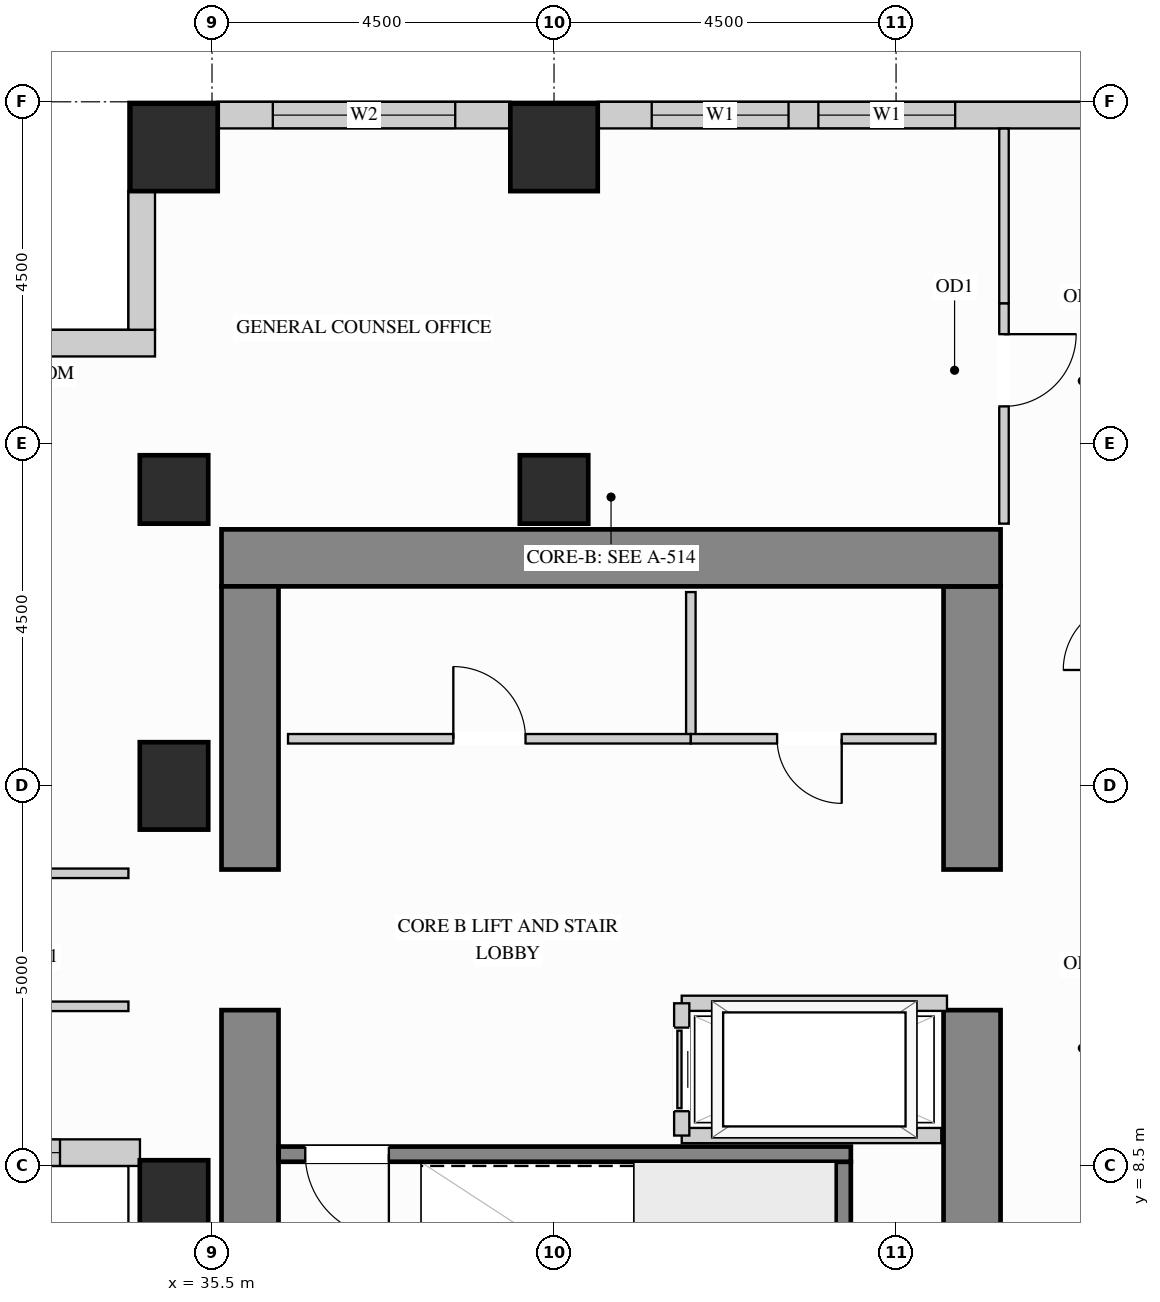
"""IFC4 building model, lengths in metres.
Left out: names, types, materials, properties, quantities, classifications, styles, units other than length and angle.
Written with IfcOpenShell. Run it as: python <this file> out.ifc"""

import sys

from ifc_helpers import new_model, si_unit, direction, frame, frame_2d, origin, origin_2d, place, context, subcontext, project, spatial, rectangle, extrude, source, transform, mapped, element, fill, save


model = new_model("IFC4")
c1 = context("Model", 3, precision=1e-05, world=origin(), true_north=direction((0.0, 1.0)))
c2 = subcontext(c1, "Body", "Model", "MODEL_VIEW")
j1 = project(units=[si_unit("LENGTHUNIT", "METRE"), si_unit("PLANEANGLEUNIT", "RADIAN")], contexts=[c1])
p1 = place(None, origin())
s1 = spatial("IfcSite", under=j1, at=p1, CompositionType="ELEMENT")
p2 = place(p1, origin())
s2 = spatial("IfcBuilding", under=s1, at=p2, CompositionType="ELEMENT")
p3 = place(p2, frame((0.0, 0.0, 88.2)))
s3 = spatial("IfcBuildingStorey", under=s2, at=p3, CompositionType="ELEMENT", Elevation=88.2)
m1 = source(origin(), c2, "Body", "SweptSolid", [
    extrude(rectangle(XDim=0.9, YDim=0.9, at=origin_2d()), origin(), (0.0, 0.0, 1.0), 3.38),
])
for number, where, z_axis, x_axis in (
    (1, (35.0, 17.4, 0.0), (0.0, 0.0, 1.0), (1.0, 0.0, 0.0)),
    (2, (40.0, 17.4, 0.0), (0.0, 0.0, 1.0), (1.0, 0.0, 0.0)),
):
    element("IfcColumn", number, at=place(p3, frame(where, z_axis=z_axis, x_axis=x_axis)), inside=s3, PredefinedType="COLUMN", context=c2, shape_type="MappedRepresentation", body=[
        mapped(m1, transform((0.0, 0.0, 0.0), x_axis=(1.0, 0.0, 0.0), y_axis=(0.0, 1.0, 0.0), z_axis=(0.0, 0.0, 1.0))),
    ])
m2 = source(origin(), c2, "Body", "SweptSolid", [
    extrude(rectangle(XDim=0.9, YDim=1.15, at=origin_2d()), origin(), (0.0, 0.0, 1.0), 3.38),
])
for number, where, z_axis, x_axis in (
    (3, (35.0, 13.5, 0.0), (0.0, 0.0, 1.0), (1.0, 0.0, 0.0)),
    (4, (35.0, 8.0, 0.0), (0.0, 0.0, 1.0), (1.0, 0.0, 0.0)),
):
    element("IfcColumn", number, at=place(p3, frame(where, z_axis=z_axis, x_axis=x_axis)), inside=s3, PredefinedType="COLUMN", context=c2, shape_type="MappedRepresentation", body=[
        mapped(m2, transform((0.0, 0.0, 0.0), x_axis=(1.0, 0.0, 0.0), y_axis=(0.0, 1.0, 0.0), z_axis=(0.0, 0.0, 1.0))),
    ])
m3 = source(origin(), c2, "Body", "SweptSolid", [
    extrude(rectangle(XDim=1.15, YDim=1.15, at=origin_2d()), origin(), (0.0, 0.0, 1.0), 3.38),
])
for number, where, z_axis, x_axis in (
    (5, (35.0, 21.9, 0.0), (0.0, 0.0, 1.0), (1.0, 0.0, 0.0)),
    (6, (40.0, 21.9, 0.0), (0.0, 0.0, 1.0), (1.0, 0.0, 0.0)),
):
    element("IfcColumn", number, at=place(p3, frame(where, z_axis=z_axis, x_axis=x_axis)), inside=s3, PredefinedType="COLUMN", context=c2, shape_type="MappedRepresentation", body=[
        mapped(m3, transform((0.0, 0.0, 0.0), x_axis=(1.0, 0.0, 0.0), y_axis=(0.0, 1.0, 0.0), z_axis=(0.0, 0.0, 1.0))),
    ])
m4 = source(origin(), c2, "Body", "SweptSolid", [
    extrude(rectangle(XDim=5.675, YDim=0.75, at=frame_2d((2.837, 0.0))), origin(), (0.0, 0.0, 1.0), 3.38),
])
p4 = place(p3, frame((45.5, 4.875, 0.0), z_axis=(0.0, 0.0, 1.0), x_axis=(0.0, 1.0, 0.0)))
e7 = element("IfcWall", 7, at=p4, inside=s3, PredefinedType="SHEAR", context=c2, shape_type="MappedRepresentation", body=[
    mapped(m4, transform((0.0, 0.0, 0.0), x_axis=(1.0, 0.0, 0.0), y_axis=(0.0, 1.0, 0.0), z_axis=(0.0, 0.0, 1.0))),
])
m5 = source(origin(), c2, "Body", "SweptSolid", [
    extrude(rectangle(XDim=3.725, YDim=0.75, at=frame_2d((1.863, 0.0))), origin(), (0.0, 0.0, 1.0), 3.38),
])
p5 = place(p3, frame((45.5, 12.4, 0.0), z_axis=(0.0, 0.0, 1.0), x_axis=(0.0, 1.0, 0.0)))
e8 = element("IfcWall", 8, at=p5, inside=s3, PredefinedType="SHEAR", context=c2, shape_type="MappedRepresentation", body=[
    mapped(m5, transform((0.0, 0.0, 0.0), x_axis=(1.0, 0.0, 0.0), y_axis=(0.0, 1.0, 0.0), z_axis=(0.0, 0.0, 1.0))),
])
m6 = source(origin(), c2, "Body", "SweptSolid", [
    extrude(rectangle(XDim=10.25, YDim=0.75, at=frame_2d((5.125, 0.0))), origin(), (0.0, 0.0, 1.0), 3.38),
])
p6 = place(p3, frame((35.625, 16.5, 0.0), z_axis=(0.0, 0.0, 1.0), x_axis=(1.0, 0.0, 0.0)))
e9 = element("IfcWall", 9, at=p6, inside=s3, PredefinedType="SHEAR", context=c2, shape_type="MappedRepresentation", body=[
    mapped(m6, transform((0.0, 0.0, 0.0), x_axis=(1.0, 0.0, 0.0), y_axis=(0.0, 1.0, 0.0), z_axis=(0.0, 0.0, 1.0))),
])
p7 = place(p3, frame((36.0, 4.875, 0.0), z_axis=(0.0, 0.0, 1.0), x_axis=(0.0, 1.0, 0.0)))
e10 = element("IfcWall", 10, at=p7, inside=s3, PredefinedType="SHEAR", context=c2, shape_type="MappedRepresentation", body=[
    mapped(m4, transform((0.0, 0.0, 0.0), x_axis=(1.0, 0.0, 0.0), y_axis=(0.0, 1.0, 0.0), z_axis=(0.0, 0.0, 1.0))),
])
p8 = place(p3, frame((36.0, 12.4, 0.0), z_axis=(0.0, 0.0, 1.0), x_axis=(0.0, 1.0, 0.0)))
e11 = element("IfcWall", 11, at=p8, inside=s3, PredefinedType="SHEAR", context=c2, shape_type="MappedRepresentation", body=[
    mapped(m5, transform((0.0, 0.0, 0.0), x_axis=(1.0, 0.0, 0.0), y_axis=(0.0, 1.0, 0.0), z_axis=(0.0, 0.0, 1.0))),
])
p9 = place(p3, frame((30.948, 8.675, 0.0), z_axis=(0.0, 0.0, 1.0), x_axis=(1.0, 0.0, 0.0)))
e12 = element("IfcWall", 12, at=p9, inside=s3, PredefinedType="SOLIDWALL", context=c2, shape_type="SweptSolid", body=[
    extrude(rectangle(XDim=3.604, YDim=0.35, at=frame_2d((1.802, 0.0))), origin(), (0.0, 0.0, 1.0), 3.365),
])
p10 = place(p9, frame((1.052, 0.0, 0.78)))
e13 = element("IfcOpeningElement", 13, at=p10, cuts=e12, PredefinedType="OPENING", context=c2, shape_type="SweptSolid", body=[
    extrude(rectangle(XDim=1.5, YDim=2.0, at=frame_2d((0.75, 1.0))), frame((0.0, 0.185, 0.0), z_axis=(0.0, -1.0, 0.0), x_axis=(1.0, 0.0, 0.0)), (0.0, 0.0, 1.0), 0.37),
])
p11 = place(p3, frame((47.027, 22.325, 0.0), z_axis=(0.0, 0.0, 1.0), x_axis=(-1.0, 0.0, 0.0)))
e14 = element("IfcWall", 14, at=p11, inside=s3, PredefinedType="SOLIDWALL", context=c2, shape_type="SweptSolid", body=[
    extrude(rectangle(XDim=6.454, YDim=0.35, at=frame_2d((3.227, 0.0))), origin(), (0.0, 0.0, 1.0), 3.365),
])
p12 = place(p11, frame((1.749, 0.0, 0.78)))
e15 = element("IfcOpeningElement", 15, at=p12, cuts=e14, PredefinedType="OPENING", context=c2, shape_type="SweptSolid", body=[
    extrude(rectangle(XDim=1.8, YDim=2.1, at=frame_2d((0.9, 1.05))), frame((0.0, 0.185, 0.0), z_axis=(0.0, -1.0, 0.0), x_axis=(1.0, 0.0, 0.0)), (0.0, 0.0, 1.0), 0.37),
])
p13 = place(p11, frame((3.942, 0.0, 0.78)))
e16 = element("IfcOpeningElement", 16, at=p13, cuts=e14, PredefinedType="OPENING", context=c2, shape_type="SweptSolid", body=[
    extrude(rectangle(XDim=1.8, YDim=2.1, at=frame_2d((0.9, 1.05))), frame((0.0, 0.185, 0.0), z_axis=(0.0, -1.0, 0.0), x_axis=(1.0, 0.0, 0.0)), (0.0, 0.0, 1.0), 0.37),
])
p14 = place(p3, frame((39.427, 22.325, 0.0), z_axis=(0.0, 0.0, 1.0), x_axis=(-1.0, 0.0, 0.0)))
e17 = element("IfcWall", 17, at=p14, inside=s3, PredefinedType="SOLIDWALL", context=c2, shape_type="SweptSolid", body=[
    extrude(rectangle(XDim=3.854, YDim=0.35, at=frame_2d((1.927, 0.0))), origin(), (0.0, 0.0, 1.0), 3.365),
])
p15 = place(p14, frame((0.727, 0.0, 0.78)))
e18 = element("IfcOpeningElement", 18, at=p15, cuts=e17, PredefinedType="OPENING", context=c2, shape_type="SweptSolid", body=[
    extrude(rectangle(XDim=2.4, YDim=2.1, at=frame_2d((1.2, 1.05))), frame((0.0, 0.185, 0.0), z_axis=(0.0, -1.0, 0.0), x_axis=(1.0, 0.0, 0.0)), (0.0, 0.0, 1.0), 0.37),
])
m7 = source(origin(), c2, "Body", "SweptSolid", [
    extrude(rectangle(XDim=1.829, YDim=0.35, at=frame_2d((0.915, 0.0))), origin(), (0.0, 0.0, 1.0), 3.365),
])
p16 = place(p3, frame((34.575, 21.327, 0.0), z_axis=(0.0, 0.0, 1.0), x_axis=(0.0, -1.0, 0.0)))
e19 = element("IfcWall", 19, at=p16, inside=s3, PredefinedType="SOLIDWALL", context=c2, shape_type="MappedRepresentation", body=[
    mapped(m7, transform((0.0, 0.0, 0.0), x_axis=(1.0, 0.0, 0.0), y_axis=(0.0, 1.0, 0.0), z_axis=(0.0, 0.0, 1.0))),
])
p17 = place(p3, frame((34.75, 19.325, 0.0), z_axis=(0.0, 0.0, 1.0), x_axis=(-1.0, 0.0, 0.0)))
e20 = element("IfcWall", 20, at=p17, inside=s3, PredefinedType="SOLIDWALL", context=c2, shape_type="SweptSolid", body=[
    extrude(rectangle(XDim=15.6, YDim=0.35, at=frame_2d((7.8, 0.0))), origin(), (0.0, 0.0, 1.0), 3.365),
])
p18 = place(p17, frame((4.307, 0.0, 0.78)))
e21 = element("IfcOpeningElement", 21, at=p18, cuts=e20, PredefinedType="OPENING", context=c2, shape_type="SweptSolid", body=[
    extrude(rectangle(XDim=1.5, YDim=2.0, at=frame_2d((0.75, 1.0))), frame((0.0, 0.185, 0.0), z_axis=(0.0, -1.0, 0.0), x_axis=(1.0, 0.0, 0.0)), (0.0, 0.0, 1.0), 0.37),
])
p19 = place(p17, frame((9.793, 0.0, 0.78)))
e22 = element("IfcOpeningElement", 22, at=p19, cuts=e20, PredefinedType="OPENING", context=c2, shape_type="SweptSolid", body=[
    extrude(rectangle(XDim=1.5, YDim=2.0, at=frame_2d((0.75, 1.0))), frame((0.0, 0.185, 0.0), z_axis=(0.0, -1.0, 0.0), x_axis=(1.0, 0.0, 0.0)), (0.0, 0.0, 1.0), 0.37),
])
m8 = source(origin(), c2, "Body", "SweptSolid", [
    extrude(rectangle(XDim=1.93, YDim=0.125, at=frame_2d((0.965, 0.0))), origin(), (0.0, 0.0, 1.0), 3.365),
])
p20 = place(p3, frame((41.8, 14.12, 0.0), z_axis=(0.0, 0.0, 1.0), x_axis=(0.0, 1.0, 0.0)))
e23 = element("IfcWall", 23, at=p20, inside=s3, PredefinedType="PARTITIONING", context=c2, shape_type="MappedRepresentation", body=[
    mapped(m8, transform((0.0, 0.0, 0.0), x_axis=(1.0, 0.0, 0.0), y_axis=(0.0, 1.0, 0.0), z_axis=(0.0, 0.0, 1.0))),
])
p21 = place(p3, frame((36.5, 14.12, 0.0), z_axis=(0.0, 0.0, 1.0), x_axis=(1.0, 0.0, 0.0)))
e24 = element("IfcWall", 24, at=p21, inside=s3, PredefinedType="PARTITIONING", context=c2, shape_type="SweptSolid", body=[
    extrude(rectangle(XDim=5.3, YDim=0.125, at=frame_2d((2.65, 0.0))), origin(), (0.0, 0.0, 1.0), 3.365),
])
p22 = place(p21, frame((2.175, 0.0, 0.0)))
e25 = element("IfcOpeningElement", 25, at=p22, cuts=e24, PredefinedType="OPENING", context=c2, shape_type="SweptSolid", body=[
    extrude(rectangle(XDim=0.95, YDim=2.15, at=frame_2d((0.475, 1.075))), frame((0.0, 0.073, 0.0), z_axis=(0.0, -1.0, 0.0), x_axis=(1.0, 0.0, 0.0)), (0.0, 0.0, 1.0), 0.145),
])
p23 = place(p3, frame((41.8, 14.12, 0.0), z_axis=(0.0, 0.0, 1.0), x_axis=(1.0, 0.0, 0.0)))
e26 = element("IfcWall", 26, at=p23, inside=s3, PredefinedType="PARTITIONING", context=c2, shape_type="SweptSolid", body=[
    extrude(rectangle(XDim=3.22, YDim=0.125, at=frame_2d((1.61, 0.0))), origin(), (0.0, 0.0, 1.0), 3.365),
])
p24 = place(p23, frame((1.135, 0.0, 0.0)))
e27 = element("IfcOpeningElement", 27, at=p24, cuts=e26, PredefinedType="OPENING", context=c2, shape_type="SweptSolid", body=[
    extrude(rectangle(XDim=0.85, YDim=2.1, at=frame_2d((0.425, 1.05))), frame((0.0, 0.073, 0.0), z_axis=(0.0, -1.0, 0.0), x_axis=(1.0, 0.0, 0.0)), (0.0, 0.0, 1.0), 0.145),
])
p25 = place(p3, frame((45.92, 16.95, 0.0), z_axis=(0.0, 0.0, 1.0), x_axis=(0.0, 1.0, 0.0)))
e28 = element("IfcWall", 28, at=p25, inside=s3, PredefinedType="PARTITIONING", context=c2, shape_type="SweptSolid", body=[
    extrude(rectangle(XDim=2.9, YDim=0.125, at=frame_2d((1.45, 0.0))), origin(), (0.0, 0.0, 1.0), 3.365),
])
p26 = place(p25, frame((1.543, 0.0, 0.0)))
e29 = element("IfcOpeningElement", 29, at=p26, cuts=e28, PredefinedType="OPENING", context=c2, shape_type="SweptSolid", body=[
    extrude(rectangle(XDim=0.95, YDim=2.15, at=frame_2d((0.475, 1.075))), frame((0.0, 0.073, 0.0), z_axis=(0.0, -1.0, 0.0), x_axis=(1.0, 0.0, 0.0)), (0.0, 0.0, 1.0), 0.145),
])
m9 = source(origin(), c2, "Body", "SweptSolid", [
    extrude(rectangle(XDim=2.298, YDim=0.125, at=frame_2d((1.149, 0.0))), origin(), (0.0, 0.0, 1.0), 3.365),
])
p27 = place(p3, frame((45.92, 19.85, 0.0), z_axis=(0.0, 0.0, 1.0), x_axis=(0.0, 1.0, 0.0)))
e30 = element("IfcWall", 30, at=p27, inside=s3, PredefinedType="PARTITIONING", context=c2, shape_type="MappedRepresentation", body=[
    mapped(m9, transform((0.0, 0.0, 0.0), x_axis=(1.0, 0.0, 0.0), y_axis=(0.0, 1.0, 0.0), z_axis=(0.0, 0.0, 1.0))),
])
p28 = place(p3, frame((29.85, 12.35, 0.0), z_axis=(0.0, 0.0, 1.0), x_axis=(1.0, 0.0, 0.0)))
e31 = element("IfcWall", 31, at=p28, inside=s3, PredefinedType="PARTITIONING", context=c2, shape_type="SweptSolid", body=[
    extrude(rectangle(XDim=4.55, YDim=0.125, at=frame_2d((2.275, 0.0))), origin(), (0.0, 0.0, 1.0), 3.365),
])
p29 = place(p28, frame((1.8, 0.0, 0.0)))
e32 = element("IfcOpeningElement", 32, at=p29, cuts=e31, PredefinedType="OPENING", context=c2, shape_type="SweptSolid", body=[
    extrude(rectangle(XDim=0.95, YDim=2.15, at=frame_2d((0.475, 1.075))), frame((0.0, 0.073, 0.0), z_axis=(0.0, -1.0, 0.0), x_axis=(1.0, 0.0, 0.0)), (0.0, 0.0, 1.0), 0.145),
])
p30 = place(p3, frame((29.85, 10.6, 0.0), z_axis=(0.0, 0.0, 1.0), x_axis=(1.0, 0.0, 0.0)))
e33 = element("IfcWall", 33, at=p30, inside=s3, PredefinedType="PARTITIONING", context=c2, shape_type="SweptSolid", body=[
    extrude(rectangle(XDim=4.55, YDim=0.125, at=frame_2d((2.275, 0.0))), origin(), (0.0, 0.0, 1.0), 3.365),
])
p31 = place(p30, frame((1.8, 0.0, 0.0)))
e34 = element("IfcOpeningElement", 34, at=p31, cuts=e33, PredefinedType="OPENING", context=c2, shape_type="SweptSolid", body=[
    extrude(rectangle(XDim=0.95, YDim=2.15, at=frame_2d((0.475, 1.075))), frame((0.0, 0.073, 0.0), z_axis=(0.0, -1.0, 0.0), x_axis=(1.0, 0.0, 0.0)), (0.0, 0.0, 1.0), 0.145),
])
m10 = source(origin(), c2, "Body", "SweptSolid", [
    extrude(rectangle(XDim=3.49, YDim=0.2, at=frame_2d((1.745, 0.0))), origin(), (0.0, 0.0, 1.0), 3.365),
])
p32 = place(p3, frame((41.68, 10.64, 0.0), z_axis=(0.0, 0.0, 1.0), x_axis=(1.0, 0.0, 0.0)))
e35 = element("IfcWall", 35, at=p32, inside=s3, PredefinedType="PARTITIONING", context=c2, shape_type="MappedRepresentation", body=[
    mapped(m10, transform((0.0, 0.0, 0.0), x_axis=(1.0, 0.0, 0.0), y_axis=(0.0, 1.0, 0.0), z_axis=(0.0, 0.0, 1.0))),
])
m11 = source(origin(), c2, "Body", "SweptSolid", [
    extrude(rectangle(XDim=3.415, YDim=0.2, at=frame_2d((1.708, 0.0))), origin(), (0.0, 0.0, 1.0), 3.365),
])
p33 = place(p3, frame((41.68, 8.9, 0.0), z_axis=(0.0, 0.0, 1.0), x_axis=(1.0, 0.0, 0.0)))
e36 = element("IfcWall", 36, at=p33, inside=s3, PredefinedType="PARTITIONING", context=c2, shape_type="MappedRepresentation", body=[
    mapped(m11, transform((0.0, 0.0, 0.0), x_axis=(1.0, 0.0, 0.0), y_axis=(0.0, 1.0, 0.0), z_axis=(0.0, 0.0, 1.0))),
])
p34 = place(p3, frame((41.68, 8.9, 0.0), z_axis=(0.0, 0.0, 1.0), x_axis=(0.0, 1.0, 0.0)))
e37 = element("IfcWall", 37, at=p34, inside=s3, PredefinedType="PARTITIONING", context=c2, shape_type="SweptSolid", body=[
    extrude(rectangle(XDim=1.74, YDim=0.2, at=frame_2d((0.87, 0.0))), origin(), (0.0, 0.0, 1.0), 3.365),
])
p35 = place(p34, frame((0.32, 0.0, 0.0)))
e38 = element("IfcOpeningElement", 38, at=p35, cuts=e37, PredefinedType="OPENING", context=c2, shape_type="SweptSolid", body=[
    extrude(rectangle(XDim=1.1, YDim=2.2, at=frame_2d((0.55, 1.1))), frame((0.0, 0.11, 0.0), z_axis=(0.0, -1.0, 0.0), x_axis=(1.0, 0.0, 0.0)), (0.0, 0.0, 1.0), 0.22),
])
m12 = source(origin(), c2, "Body", "SweptSolid", [
    extrude(rectangle(XDim=3.678, YDim=0.2, at=frame_2d((1.839, 0.0))), origin(), (0.0, 0.0, 1.0), 3.38),
])
p36 = place(p3, frame((43.805, 4.877, 0.0), z_axis=(0.0, 0.0, 1.0), x_axis=(0.0, 1.0, 0.0)))
e39 = element("IfcWall", 39, at=p36, inside=s3, PredefinedType="SHEAR", context=c2, shape_type="MappedRepresentation", body=[
    mapped(m12, transform((0.0, 0.0, 0.0), x_axis=(1.0, 0.0, 0.0), y_axis=(0.0, 1.0, 0.0), z_axis=(0.0, 0.0, 1.0))),
])
p37 = place(p3, frame((36.377, 8.655, 0.0), z_axis=(0.0, 0.0, 1.0), x_axis=(1.0, 0.0, 0.0)))
e40 = element("IfcWall", 40, at=p37, inside=s3, PredefinedType="SHEAR", context=c2, shape_type="SweptSolid", body=[
    extrude(rectangle(XDim=7.528, YDim=0.2, at=frame_2d((3.764, 0.0))), origin(), (0.0, 0.0, 1.0), 3.38),
])
p38 = place(p37, frame((0.35, 0.0, 0.0)))
e41 = element("IfcOpeningElement", 41, at=p38, cuts=e40, PredefinedType="OPENING", context=c2, shape_type="SweptSolid", body=[
    extrude(rectangle(XDim=1.1, YDim=2.15, at=frame_2d((0.55, 1.075))), frame((0.0, 0.11, 0.0), z_axis=(0.0, -1.0, 0.0), x_axis=(1.0, 0.0, 0.0)), (0.0, 0.0, 1.0), 0.22),
])
m13 = source(origin(), c2, "Body", "SweptSolid", [
    extrude(rectangle(XDim=1.1, YDim=2.2, at=frame_2d((0.55, 1.1))), frame((0.0, 0.025, 0.0), z_axis=(0.0, -1.0, 0.0), x_axis=(1.0, 0.0, 0.0)), (0.0, 0.0, 1.0), 0.05),
])
p39 = place(p35, origin())
e42 = element("IfcDoor", 42, at=p39, inside=s3, OperationType="SLIDING_TO_LEFT", PredefinedType="DOOR", context=c2, shape_type="MappedRepresentation", body=[
    mapped(m13, transform((0.0, 0.0, 0.0), x_axis=(1.0, 0.0, 0.0), y_axis=(0.0, 1.0, 0.0), z_axis=(0.0, 0.0, 1.0))),
])
fill(e38, e42)
m14 = source(origin(), c2, "Body", "SweptSolid", [
    extrude(rectangle(XDim=0.95, YDim=2.15, at=frame_2d((0.475, 1.075))), frame((0.0, 0.025, 0.0), z_axis=(0.0, -1.0, 0.0), x_axis=(1.0, 0.0, 0.0)), (0.0, 0.0, 1.0), 0.05),
])
p40 = place(p22, origin())
e43 = element("IfcDoor", 43, at=p40, inside=s3, OperationType="SINGLE_SWING_LEFT", PredefinedType="DOOR", context=c2, shape_type="MappedRepresentation", body=[
    mapped(m14, transform((0.0, 0.0, 0.0), x_axis=(1.0, 0.0, 0.0), y_axis=(0.0, 1.0, 0.0), z_axis=(0.0, 0.0, 1.0))),
])
fill(e25, e43)
p41 = place(p26, origin())
e44 = element("IfcDoor", 44, at=p41, inside=s3, OperationType="SINGLE_SWING_RIGHT", PredefinedType="DOOR", context=c2, shape_type="MappedRepresentation", body=[
    mapped(m14, transform((0.0, 0.0, 0.0), x_axis=(1.0, 0.0, 0.0), y_axis=(0.0, 1.0, 0.0), z_axis=(0.0, 0.0, 1.0))),
])
fill(e29, e44)
m15 = source(origin(), c2, "Body", "SweptSolid", [
    extrude(rectangle(XDim=0.85, YDim=2.1, at=frame_2d((0.425, 1.05))), frame((0.0, 0.025, 0.0), z_axis=(0.0, -1.0, 0.0), x_axis=(1.0, 0.0, 0.0)), (0.0, 0.0, 1.0), 0.05),
])
p42 = place(p24, origin())
e45 = element("IfcDoor", 45, at=p42, inside=s3, OperationType="SINGLE_SWING_RIGHT", PredefinedType="DOOR", context=c2, shape_type="MappedRepresentation", body=[
    mapped(m15, transform((0.0, 0.0, 0.0), x_axis=(1.0, 0.0, 0.0), y_axis=(0.0, 1.0, 0.0), z_axis=(0.0, 0.0, 1.0))),
])
fill(e27, e45)
m16 = source(origin(), c2, "Body", "SweptSolid", [
    extrude(rectangle(XDim=1.1, YDim=2.15, at=frame_2d((0.55, 1.075))), frame((0.0, 0.025, 0.0), z_axis=(0.0, -1.0, 0.0), x_axis=(1.0, 0.0, 0.0)), (0.0, 0.0, 1.0), 0.05),
])
p43 = place(p38, origin())
e46 = element("IfcDoor", 46, at=p43, inside=s3, OperationType="SINGLE_SWING_RIGHT", PredefinedType="DOOR", context=c2, shape_type="MappedRepresentation", body=[
    mapped(m16, transform((0.0, 0.0, 0.0), x_axis=(1.0, 0.0, 0.0), y_axis=(0.0, 1.0, 0.0), z_axis=(0.0, 0.0, 1.0))),
])
fill(e41, e46)
m17 = source(origin(), c2, "Body", "SweptSolid", [
    extrude(rectangle(XDim=1.8, YDim=2.1, at=frame_2d((0.9, 1.05))), frame((0.0, 0.03, 0.0), z_axis=(0.0, -1.0, 0.0), x_axis=(1.0, 0.0, 0.0)), (0.0, 0.0, 1.0), 0.06),
])
p44 = place(p12, origin())
e47 = element("IfcWindow", 47, at=p44, inside=s3, PartitioningType="SINGLE_PANEL", PredefinedType="WINDOW", context=c2, shape_type="MappedRepresentation", body=[
    mapped(m17, transform((0.0, 0.0, 0.0), x_axis=(1.0, 0.0, 0.0), y_axis=(0.0, 1.0, 0.0), z_axis=(0.0, 0.0, 1.0))),
])
fill(e15, e47)
p45 = place(p13, origin())
e48 = element("IfcWindow", 48, at=p45, inside=s3, PartitioningType="SINGLE_PANEL", PredefinedType="WINDOW", context=c2, shape_type="MappedRepresentation", body=[
    mapped(m17, transform((0.0, 0.0, 0.0), x_axis=(1.0, 0.0, 0.0), y_axis=(0.0, 1.0, 0.0), z_axis=(0.0, 0.0, 1.0))),
])
fill(e16, e48)
m18 = source(origin(), c2, "Body", "SweptSolid", [
    extrude(rectangle(XDim=2.4, YDim=2.1, at=frame_2d((1.2, 1.05))), frame((0.0, 0.03, 0.0), z_axis=(0.0, -1.0, 0.0), x_axis=(1.0, 0.0, 0.0)), (0.0, 0.0, 1.0), 0.06),
])
p46 = place(p15, origin())
e49 = element("IfcWindow", 49, at=p46, inside=s3, PartitioningType="SINGLE_PANEL", PredefinedType="WINDOW", context=c2, shape_type="MappedRepresentation", body=[
    mapped(m18, transform((0.0, 0.0, 0.0), x_axis=(1.0, 0.0, 0.0), y_axis=(0.0, 1.0, 0.0), z_axis=(0.0, 0.0, 1.0))),
])
fill(e18, e49)
m19 = source(origin(), c2, "Body", "SweptSolid", [
    extrude(rectangle(XDim=1.5, YDim=2.0, at=frame_2d((0.75, 1.0))), frame((0.0, 0.03, 0.0), z_axis=(0.0, -1.0, 0.0), x_axis=(1.0, 0.0, 0.0)), (0.0, 0.0, 1.0), 0.06),
])
p47 = place(p10, origin())
e50 = element("IfcWindow", 50, at=p47, inside=s3, PartitioningType="SINGLE_PANEL", PredefinedType="WINDOW", context=c2, shape_type="MappedRepresentation", body=[
    mapped(m19, transform((0.0, 0.0, 0.0), x_axis=(1.0, 0.0, 0.0), y_axis=(0.0, 1.0, 0.0), z_axis=(0.0, 0.0, 1.0))),
])
fill(e13, e50)
save(model, sys.argv[1])
